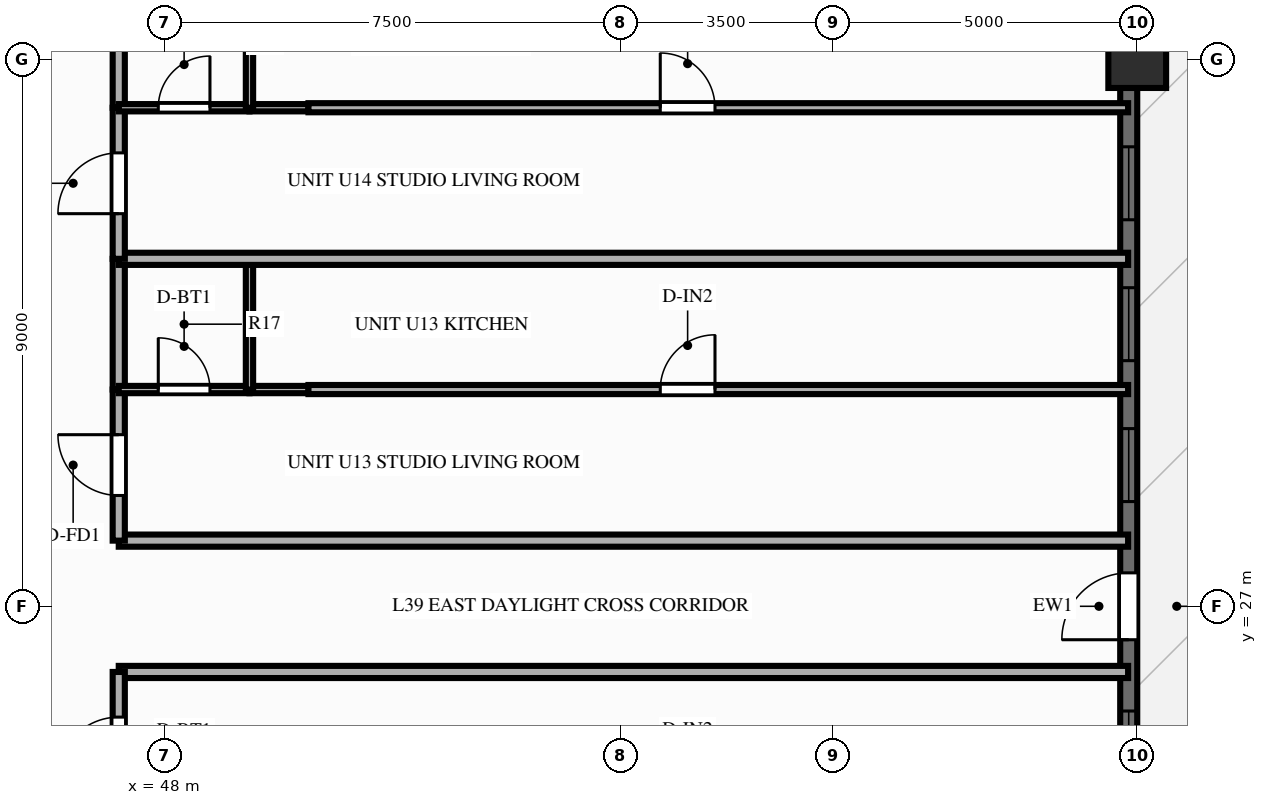
"""IFC4 building model, lengths in metres.
Left out: names, types, materials, properties, quantities, classifications, styles, units other than length and angle.
Written with IfcOpenShell. Run it as: python <this file> out.ifc"""

import sys

from ifc_helpers import new_model, si_unit, direction, frame, frame_2d, origin, origin_2d, place, context, subcontext, project, spatial, rectangle, extrude, source, transform, mapped, element, fill, save


model = new_model("IFC4")
c1 = context("Model", 3, precision=1e-05, world=origin(), true_north=direction((0.0, 1.0)))
c2 = subcontext(c1, "Body", "Model", "MODEL_VIEW")
j1 = project(units=[si_unit("LENGTHUNIT", "METRE"), si_unit("PLANEANGLEUNIT", "RADIAN")], contexts=[c1])
p1 = place(None, origin())
s1 = spatial("IfcSite", under=j1, at=p1, CompositionType="ELEMENT")
p2 = place(p1, origin())
s2 = spatial("IfcBuilding", under=s1, at=p2, CompositionType="ELEMENT")
p3 = place(p2, frame((0.0, 0.0, 122.85)))
s3 = spatial("IfcBuildingStorey", under=s2, at=p3, CompositionType="ELEMENT", Elevation=122.85)
m1 = source(origin(), c2, "Body", "SweptSolid", [
    extrude(rectangle(XDim=0.95, YDim=0.95, at=origin_2d()), origin(), (0.0, 0.0, 1.0), 3.9),
])
p4 = place(p3, frame((64.0, 36.0, 0.0), z_axis=(0.0, 0.0, 1.0), x_axis=(1.0, 0.0, 0.0)))
e1 = element("IfcColumn", 1, at=p4, inside=s3, PredefinedType="COLUMN", context=c2, shape_type="MappedRepresentation", body=[
    mapped(m1, transform((0.0, 0.0, 0.0), scale=1.0)),
])
p5 = place(p3, frame((63.86, 7.2, 0.0), z_axis=(0.0, 0.0, 1.0), x_axis=(0.0, 1.0, 0.0)))
e2 = element("IfcWall", 2, at=p5, inside=s3, PredefinedType="SOLIDWALL", context=c2, shape_type="SweptSolid", body=[
    extrude(rectangle(XDim=39.6, YDim=0.28, at=frame_2d((19.8, 0.0))), origin(), (0.0, 0.0, 1.0), 2.24),
])
p6 = place(p5, frame((0.89, 0.0, 0.25)))
e3 = element("IfcOpeningElement", 3, at=p6, cuts=e2, PredefinedType="OPENING", context=c2, shape_type="SweptSolid", body=[
    extrude(rectangle(XDim=1.2, YDim=1.5, at=frame_2d((0.6, 0.75))), frame((0.0, 0.152, 0.0), z_axis=(0.0, -1.0, 0.0), x_axis=(1.0, 0.0, 0.0)), (0.0, 0.0, 1.0), 0.304),
])
p7 = place(p5, frame((3.14, 0.0, 0.25)))
e4 = element("IfcOpeningElement", 4, at=p7, cuts=e2, PredefinedType="OPENING", context=c2, shape_type="SweptSolid", body=[
    extrude(rectangle(XDim=1.2, YDim=1.5, at=frame_2d((0.6, 0.75))), frame((0.0, 0.152, 0.0), z_axis=(0.0, -1.0, 0.0), x_axis=(1.0, 0.0, 0.0)), (0.0, 0.0, 1.0), 0.304),
])
p8 = place(p5, frame((5.458, 0.0, 0.25)))
e5 = element("IfcOpeningElement", 5, at=p8, cuts=e2, PredefinedType="OPENING", context=c2, shape_type="SweptSolid", body=[
    extrude(rectangle(XDim=1.2, YDim=1.5, at=frame_2d((0.6, 0.75))), frame((0.0, 0.152, 0.0), z_axis=(0.0, -1.0, 0.0), x_axis=(1.0, 0.0, 0.0)), (0.0, 0.0, 1.0), 0.304),
])
p9 = place(p5, frame((7.775, 0.0, 0.25)))
e6 = element("IfcOpeningElement", 6, at=p9, cuts=e2, PredefinedType="OPENING", context=c2, shape_type="SweptSolid", body=[
    extrude(rectangle(XDim=1.2, YDim=1.5, at=frame_2d((0.6, 0.75))), frame((0.0, 0.152, 0.0), z_axis=(0.0, -1.0, 0.0), x_axis=(1.0, 0.0, 0.0)), (0.0, 0.0, 1.0), 0.304),
])
p10 = place(p5, frame((12.242, 0.0, 0.25)))
e7 = element("IfcOpeningElement", 7, at=p10, cuts=e2, PredefinedType="OPENING", context=c2, shape_type="SweptSolid", body=[
    extrude(rectangle(XDim=1.2, YDim=1.5, at=frame_2d((0.6, 0.75))), frame((0.0, 0.152, 0.0), z_axis=(0.0, -1.0, 0.0), x_axis=(1.0, 0.0, 0.0)), (0.0, 0.0, 1.0), 0.304),
])
p11 = place(p5, frame((14.56, 0.0, 0.25)))
e8 = element("IfcOpeningElement", 8, at=p11, cuts=e2, PredefinedType="OPENING", context=c2, shape_type="SweptSolid", body=[
    extrude(rectangle(XDim=1.2, YDim=1.5, at=frame_2d((0.6, 0.75))), frame((0.0, 0.152, 0.0), z_axis=(0.0, -1.0, 0.0), x_axis=(1.0, 0.0, 0.0)), (0.0, 0.0, 1.0), 0.304),
])
p12 = place(p5, frame((16.877, 0.0, 0.25)))
e9 = element("IfcOpeningElement", 9, at=p12, cuts=e2, PredefinedType="OPENING", context=c2, shape_type="SweptSolid", body=[
    extrude(rectangle(XDim=1.2, YDim=1.5, at=frame_2d((0.6, 0.75))), frame((0.0, 0.152, 0.0), z_axis=(0.0, -1.0, 0.0), x_axis=(1.0, 0.0, 0.0)), (0.0, 0.0, 1.0), 0.304),
])
p13 = place(p5, frame((20.35, 0.0, 0.0), z_axis=(0.0, 0.0, 1.0), x_axis=(-1.0, 0.0, 0.0)))
e10 = element("IfcOpeningElement", 10, at=p13, cuts=e2, PredefinedType="OPENING", context=c2, shape_type="SweptSolid", body=[
    extrude(rectangle(XDim=1.1, YDim=2.15, at=frame_2d((0.55, 1.075))), frame((0.0, 0.152, 0.0), z_axis=(0.0, -1.0, 0.0), x_axis=(1.0, 0.0, 0.0)), (0.0, 0.0, 1.0), 0.304),
])
p14 = place(p5, frame((21.522, 0.0, 0.25)))
e11 = element("IfcOpeningElement", 11, at=p14, cuts=e2, PredefinedType="OPENING", context=c2, shape_type="SweptSolid", body=[
    extrude(rectangle(XDim=1.2, YDim=1.5, at=frame_2d((0.6, 0.75))), frame((0.0, 0.152, 0.0), z_axis=(0.0, -1.0, 0.0), x_axis=(1.0, 0.0, 0.0)), (0.0, 0.0, 1.0), 0.304),
])
p15 = place(p5, frame((23.84, 0.0, 0.25)))
e12 = element("IfcOpeningElement", 12, at=p15, cuts=e2, PredefinedType="OPENING", context=c2, shape_type="SweptSolid", body=[
    extrude(rectangle(XDim=1.2, YDim=1.5, at=frame_2d((0.6, 0.75))), frame((0.0, 0.152, 0.0), z_axis=(0.0, -1.0, 0.0), x_axis=(1.0, 0.0, 0.0)), (0.0, 0.0, 1.0), 0.304),
])
p16 = place(p5, frame((26.157, 0.0, 0.25)))
e13 = element("IfcOpeningElement", 13, at=p16, cuts=e2, PredefinedType="OPENING", context=c2, shape_type="SweptSolid", body=[
    extrude(rectangle(XDim=1.2, YDim=1.5, at=frame_2d((0.6, 0.75))), frame((0.0, 0.152, 0.0), z_axis=(0.0, -1.0, 0.0), x_axis=(1.0, 0.0, 0.0)), (0.0, 0.0, 1.0), 0.304),
])
p17 = place(p5, frame((30.625, 0.0, 0.25)))
e14 = element("IfcOpeningElement", 14, at=p17, cuts=e2, PredefinedType="OPENING", context=c2, shape_type="SweptSolid", body=[
    extrude(rectangle(XDim=1.2, YDim=1.5, at=frame_2d((0.6, 0.75))), frame((0.0, 0.152, 0.0), z_axis=(0.0, -1.0, 0.0), x_axis=(1.0, 0.0, 0.0)), (0.0, 0.0, 1.0), 0.304),
])
p18 = place(p5, frame((32.942, 0.0, 0.25)))
e15 = element("IfcOpeningElement", 15, at=p18, cuts=e2, PredefinedType="OPENING", context=c2, shape_type="SweptSolid", body=[
    extrude(rectangle(XDim=1.2, YDim=1.5, at=frame_2d((0.6, 0.75))), frame((0.0, 0.152, 0.0), z_axis=(0.0, -1.0, 0.0), x_axis=(1.0, 0.0, 0.0)), (0.0, 0.0, 1.0), 0.304),
])
p19 = place(p5, frame((35.26, 0.0, 0.25)))
e16 = element("IfcOpeningElement", 16, at=p19, cuts=e2, PredefinedType="OPENING", context=c2, shape_type="SweptSolid", body=[
    extrude(rectangle(XDim=1.2, YDim=1.5, at=frame_2d((0.6, 0.75))), frame((0.0, 0.152, 0.0), z_axis=(0.0, -1.0, 0.0), x_axis=(1.0, 0.0, 0.0)), (0.0, 0.0, 1.0), 0.304),
])
p20 = place(p5, frame((37.51, 0.0, 0.25)))
e17 = element("IfcOpeningElement", 17, at=p20, cuts=e2, PredefinedType="OPENING", context=c2, shape_type="SweptSolid", body=[
    extrude(rectangle(XDim=1.2, YDim=1.5, at=frame_2d((0.6, 0.75))), frame((0.0, 0.152, 0.0), z_axis=(0.0, -1.0, 0.0), x_axis=(1.0, 0.0, 0.0)), (0.0, 0.0, 1.0), 0.304),
])
p21 = place(p3, frame((47.25, 25.92, 0.0), z_axis=(0.0, 0.0, 1.0), x_axis=(1.0, 0.0, 0.0)))
e18 = element("IfcWall", 18, at=p21, inside=s3, PredefinedType="PARTITIONING", context=c2, shape_type="SweptSolid", body=[
    extrude(rectangle(XDim=16.6, YDim=0.2, at=frame_2d((8.3, 0.0))), origin(), (0.0, 0.0, 1.0), 3.56),
])
p22 = place(p3, frame((47.25, 23.435, 0.0), z_axis=(0.0, 0.0, 1.0), x_axis=(0.0, 1.0, 0.0)))
e19 = element("IfcWall", 19, at=p22, inside=s3, PredefinedType="PARTITIONING", context=c2, shape_type="SweptSolid", body=[
    extrude(rectangle(XDim=2.485, YDim=0.2, at=frame_2d((1.242, 0.0))), origin(), (0.0, 0.0, 1.0), 3.56),
])
p23 = place(p22, frame((0.742, 0.0, 0.0)))
e20 = element("IfcOpeningElement", 20, at=p23, cuts=e19, PredefinedType="OPENING", context=c2, shape_type="SweptSolid", body=[
    extrude(rectangle(XDim=1.0, YDim=2.15, at=frame_2d((0.5, 1.075))), frame((0.0, 0.112, 0.0), z_axis=(0.0, -1.0, 0.0), x_axis=(1.0, 0.0, 0.0)), (0.0, 0.0, 1.0), 0.224),
])
p24 = place(p3, frame((47.25, 28.08, 0.0), z_axis=(0.0, 0.0, 1.0), x_axis=(1.0, 0.0, 0.0)))
e21 = element("IfcWall", 21, at=p24, inside=s3, PredefinedType="PARTITIONING", context=c2, shape_type="SweptSolid", body=[
    extrude(rectangle(XDim=16.6, YDim=0.2, at=frame_2d((8.3, 0.0))), origin(), (0.0, 0.0, 1.0), 3.56),
])
p25 = place(p3, frame((47.25, 28.08, 0.0), z_axis=(0.0, 0.0, 1.0), x_axis=(0.0, 1.0, 0.0)))
e22 = element("IfcWall", 22, at=p25, inside=s3, PredefinedType="PARTITIONING", context=c2, shape_type="SweptSolid", body=[
    extrude(rectangle(XDim=2.485, YDim=0.2, at=frame_2d((1.242, 0.0))), origin(), (0.0, 0.0, 1.0), 3.56),
])
p26 = place(p25, frame((0.742, 0.0, 0.0)))
e23 = element("IfcOpeningElement", 23, at=p26, cuts=e22, PredefinedType="OPENING", context=c2, shape_type="SweptSolid", body=[
    extrude(rectangle(XDim=1.0, YDim=2.15, at=frame_2d((0.5, 1.075))), frame((0.0, 0.112, 0.0), z_axis=(0.0, -1.0, 0.0), x_axis=(1.0, 0.0, 0.0)), (0.0, 0.0, 1.0), 0.224),
])
p27 = place(p3, frame((47.25, 30.565, 0.0), z_axis=(0.0, 0.0, 1.0), x_axis=(0.0, 1.0, 0.0)))
e24 = element("IfcWall", 24, at=p27, inside=s3, PredefinedType="PARTITIONING", context=c2, shape_type="SweptSolid", body=[
    extrude(rectangle(XDim=2.15, YDim=0.2, at=frame_2d((1.075, 0.0))), origin(), (0.0, 0.0, 1.0), 3.56),
])
p28 = place(p3, frame((47.25, 30.565, 0.0), z_axis=(0.0, 0.0, 1.0), x_axis=(1.0, 0.0, 0.0)))
e25 = element("IfcWall", 25, at=p28, inside=s3, PredefinedType="PARTITIONING", context=c2, shape_type="SweptSolid", body=[
    extrude(rectangle(XDim=2.15, YDim=0.12, at=frame_2d((1.075, 0.0))), origin(), (0.0, 0.0, 1.0), 3.56),
])
p29 = place(p28, frame((0.65, 0.0, 0.0)))
e26 = element("IfcOpeningElement", 26, at=p29, cuts=e25, PredefinedType="OPENING", context=c2, shape_type="SweptSolid", body=[
    extrude(rectangle(XDim=0.85, YDim=2.05, at=frame_2d((0.425, 1.025))), frame((0.0, 0.072, 0.0), z_axis=(0.0, -1.0, 0.0), x_axis=(1.0, 0.0, 0.0)), (0.0, 0.0, 1.0), 0.144),
])
p30 = place(p3, frame((49.4, 30.565, 0.0), z_axis=(0.0, 0.0, 1.0), x_axis=(1.0, 0.0, 0.0)))
e27 = element("IfcWall", 27, at=p30, inside=s3, PredefinedType="PARTITIONING", context=c2, shape_type="SweptSolid", body=[
    extrude(rectangle(XDim=0.97, YDim=0.12, at=frame_2d((0.485, 0.0))), origin(), (0.0, 0.0, 1.0), 3.56),
])
p31 = place(p3, frame((49.4, 30.565, 0.0), z_axis=(0.0, 0.0, 1.0), x_axis=(0.0, 1.0, 0.0)))
e28 = element("IfcWall", 28, at=p31, inside=s3, PredefinedType="PARTITIONING", context=c2, shape_type="SweptSolid", body=[
    extrude(rectangle(XDim=2.15, YDim=0.12, at=frame_2d((1.075, 0.0))), origin(), (0.0, 0.0, 1.0), 3.56),
])
p32 = place(p3, frame((50.37, 30.565, 0.0), z_axis=(0.0, 0.0, 1.0), x_axis=(1.0, 0.0, 0.0)))
e29 = element("IfcWall", 29, at=p32, inside=s3, PredefinedType="PARTITIONING", context=c2, shape_type="SweptSolid", body=[
    extrude(rectangle(XDim=13.48, YDim=0.15, at=frame_2d((6.74, 0.0))), origin(), (0.0, 0.0, 1.0), 3.56),
])
p33 = place(p32, frame((5.786, 0.0, 0.0)))
e30 = element("IfcOpeningElement", 30, at=p33, cuts=e29, PredefinedType="OPENING", context=c2, shape_type="SweptSolid", body=[
    extrude(rectangle(XDim=0.9, YDim=2.1, at=frame_2d((0.45, 1.05))), frame((0.0, 0.087, 0.0), z_axis=(0.0, -1.0, 0.0), x_axis=(1.0, 0.0, 0.0)), (0.0, 0.0, 1.0), 0.174),
])
p34 = place(p3, frame((47.25, 32.715, 0.0), z_axis=(0.0, 0.0, 1.0), x_axis=(1.0, 0.0, 0.0)))
e31 = element("IfcWall", 31, at=p34, inside=s3, PredefinedType="PARTITIONING", context=c2, shape_type="SweptSolid", body=[
    extrude(rectangle(XDim=16.6, YDim=0.2, at=frame_2d((8.3, 0.0))), origin(), (0.0, 0.0, 1.0), 3.56),
])
p35 = place(p3, frame((47.25, 32.715, 0.0), z_axis=(0.0, 0.0, 1.0), x_axis=(0.0, 1.0, 0.0)))
e32 = element("IfcWall", 32, at=p35, inside=s3, PredefinedType="PARTITIONING", context=c2, shape_type="SweptSolid", body=[
    extrude(rectangle(XDim=2.485, YDim=0.2, at=frame_2d((1.242, 0.0))), origin(), (0.0, 0.0, 1.0), 3.56),
])
p36 = place(p35, frame((0.742, 0.0, 0.0)))
e33 = element("IfcOpeningElement", 33, at=p36, cuts=e32, PredefinedType="OPENING", context=c2, shape_type="SweptSolid", body=[
    extrude(rectangle(XDim=1.0, YDim=2.15, at=frame_2d((0.5, 1.075))), frame((0.0, 0.112, 0.0), z_axis=(0.0, -1.0, 0.0), x_axis=(1.0, 0.0, 0.0)), (0.0, 0.0, 1.0), 0.224),
])
p37 = place(p3, frame((47.25, 35.2, 0.0), z_axis=(0.0, 0.0, 1.0), x_axis=(0.0, 1.0, 0.0)))
e34 = element("IfcWall", 34, at=p37, inside=s3, PredefinedType="PARTITIONING", context=c2, shape_type="SweptSolid", body=[
    extrude(rectangle(XDim=2.15, YDim=0.2, at=frame_2d((1.075, 0.0))), origin(), (0.0, 0.0, 1.0), 3.56),
])
p38 = place(p3, frame((47.25, 35.2, 0.0), z_axis=(0.0, 0.0, 1.0), x_axis=(1.0, 0.0, 0.0)))
e35 = element("IfcWall", 35, at=p38, inside=s3, PredefinedType="PARTITIONING", context=c2, shape_type="SweptSolid", body=[
    extrude(rectangle(XDim=2.15, YDim=0.12, at=frame_2d((1.075, 0.0))), origin(), (0.0, 0.0, 1.0), 3.56),
])
p39 = place(p38, frame((0.65, 0.0, 0.0)))
e36 = element("IfcOpeningElement", 36, at=p39, cuts=e35, PredefinedType="OPENING", context=c2, shape_type="SweptSolid", body=[
    extrude(rectangle(XDim=0.85, YDim=2.05, at=frame_2d((0.425, 1.025))), frame((0.0, 0.072, 0.0), z_axis=(0.0, -1.0, 0.0), x_axis=(1.0, 0.0, 0.0)), (0.0, 0.0, 1.0), 0.144),
])
p40 = place(p3, frame((49.4, 35.2, 0.0), z_axis=(0.0, 0.0, 1.0), x_axis=(1.0, 0.0, 0.0)))
e37 = element("IfcWall", 37, at=p40, inside=s3, PredefinedType="PARTITIONING", context=c2, shape_type="SweptSolid", body=[
    extrude(rectangle(XDim=0.97, YDim=0.12, at=frame_2d((0.485, 0.0))), origin(), (0.0, 0.0, 1.0), 3.56),
])
p41 = place(p3, frame((49.4, 35.2, 0.0), z_axis=(0.0, 0.0, 1.0), x_axis=(0.0, 1.0, 0.0)))
e38 = element("IfcWall", 38, at=p41, inside=s3, PredefinedType="PARTITIONING", context=c2, shape_type="SweptSolid", body=[
    extrude(rectangle(XDim=2.15, YDim=0.12, at=frame_2d((1.075, 0.0))), origin(), (0.0, 0.0, 1.0), 3.56),
])
p42 = place(p3, frame((50.37, 35.2, 0.0), z_axis=(0.0, 0.0, 1.0), x_axis=(1.0, 0.0, 0.0)))
e39 = element("IfcWall", 39, at=p42, inside=s3, PredefinedType="PARTITIONING", context=c2, shape_type="SweptSolid", body=[
    extrude(rectangle(XDim=13.48, YDim=0.15, at=frame_2d((6.74, 0.0))), origin(), (0.0, 0.0, 1.0), 3.56),
])
p43 = place(p42, frame((5.786, 0.0, 0.0)))
e40 = element("IfcOpeningElement", 40, at=p43, cuts=e39, PredefinedType="OPENING", context=c2, shape_type="SweptSolid", body=[
    extrude(rectangle(XDim=0.9, YDim=2.1, at=frame_2d((0.45, 1.05))), frame((0.0, 0.087, 0.0), z_axis=(0.0, -1.0, 0.0), x_axis=(1.0, 0.0, 0.0)), (0.0, 0.0, 1.0), 0.174),
])
m2 = source(origin(), c2, "Body", "SweptSolid", [
    extrude(rectangle(XDim=1.2, YDim=1.5, at=frame_2d((0.6, 0.75))), frame((0.0, 0.03, 0.0), z_axis=(0.0, -1.0, 0.0), x_axis=(1.0, 0.0, 0.0)), (0.0, 0.0, 1.0), 0.06),
])
p44 = place(p12, origin())
e41 = element("IfcWindow", 41, at=p44, inside=s3, PartitioningType="SINGLE_PANEL", PredefinedType="WINDOW", context=c2, shape_type="MappedRepresentation", body=[
    mapped(m2, transform((0.0, 0.0, 0.0), scale=1.0)),
])
fill(e9, e41)
m3 = source(origin(), c2, "Body", "SweptSolid", [
    extrude(rectangle(XDim=1.1, YDim=2.15, at=frame_2d((0.55, 1.075))), frame((0.0, 0.025, 0.0), z_axis=(0.0, -1.0, 0.0), x_axis=(1.0, 0.0, 0.0)), (0.0, 0.0, 1.0), 0.05),
])
p45 = place(p13, origin())
e42 = element("IfcDoor", 42, at=p45, inside=s3, OperationType="SINGLE_SWING_RIGHT", PredefinedType="DOOR", context=c2, shape_type="MappedRepresentation", body=[
    mapped(m3, transform((0.0, 0.0, 0.0), scale=1.0)),
])
fill(e10, e42)
p46 = place(p14, origin())
e43 = element("IfcWindow", 43, at=p46, inside=s3, PartitioningType="SINGLE_PANEL", PredefinedType="WINDOW", context=c2, shape_type="MappedRepresentation", body=[
    mapped(m2, transform((0.0, 0.0, 0.0), scale=1.0)),
])
fill(e11, e43)
p47 = place(p15, origin())
e44 = element("IfcWindow", 44, at=p47, inside=s3, PartitioningType="SINGLE_PANEL", PredefinedType="WINDOW", context=c2, shape_type="MappedRepresentation", body=[
    mapped(m2, transform((0.0, 0.0, 0.0), scale=1.0)),
])
fill(e12, e44)
p48 = place(p16, origin())
e45 = element("IfcWindow", 45, at=p48, inside=s3, PartitioningType="SINGLE_PANEL", PredefinedType="WINDOW", context=c2, shape_type="MappedRepresentation", body=[
    mapped(m2, transform((0.0, 0.0, 0.0), scale=1.0)),
])
fill(e13, e45)
m4 = source(origin(), c2, "Body", "SweptSolid", [
    extrude(rectangle(XDim=1.0, YDim=2.15, at=frame_2d((0.5, 1.075))), frame((0.0, 0.025, 0.0), z_axis=(0.0, -1.0, 0.0), x_axis=(1.0, 0.0, 0.0)), (0.0, 0.0, 1.0), 0.05),
])
p49 = place(p23, origin())
e46 = element("IfcDoor", 46, at=p49, inside=s3, OperationType="SINGLE_SWING_LEFT", PredefinedType="DOOR", context=c2, shape_type="MappedRepresentation", body=[
    mapped(m4, transform((0.0, 0.0, 0.0), scale=1.0)),
])
fill(e20, e46)
p50 = place(p26, origin())
e47 = element("IfcDoor", 47, at=p50, inside=s3, OperationType="SINGLE_SWING_RIGHT", PredefinedType="DOOR", context=c2, shape_type="MappedRepresentation", body=[
    mapped(m4, transform((0.0, 0.0, 0.0), scale=1.0)),
])
fill(e23, e47)
m5 = source(origin(), c2, "Body", "SweptSolid", [
    extrude(rectangle(XDim=0.85, YDim=2.05, at=frame_2d((0.425, 1.025))), frame((0.0, 0.025, 0.0), z_axis=(0.0, -1.0, 0.0), x_axis=(1.0, 0.0, 0.0)), (0.0, 0.0, 1.0), 0.05),
])
p51 = place(p29, origin())
e48 = element("IfcDoor", 48, at=p51, inside=s3, OperationType="SINGLE_SWING_LEFT", PredefinedType="DOOR", context=c2, shape_type="MappedRepresentation", body=[
    mapped(m5, transform((0.0, 0.0, 0.0), scale=1.0)),
])
fill(e26, e48)
m6 = source(origin(), c2, "Body", "SweptSolid", [
    extrude(rectangle(XDim=0.9, YDim=2.1, at=frame_2d((0.45, 1.05))), frame((0.0, 0.025, 0.0), z_axis=(0.0, -1.0, 0.0), x_axis=(1.0, 0.0, 0.0)), (0.0, 0.0, 1.0), 0.05),
])
p52 = place(p33, origin())
e49 = element("IfcDoor", 49, at=p52, inside=s3, OperationType="SINGLE_SWING_RIGHT", PredefinedType="DOOR", context=c2, shape_type="MappedRepresentation", body=[
    mapped(m6, transform((0.0, 0.0, 0.0), scale=1.0)),
])
fill(e30, e49)
p53 = place(p36, origin())
e50 = element("IfcDoor", 50, at=p53, inside=s3, OperationType="SINGLE_SWING_LEFT", PredefinedType="DOOR", context=c2, shape_type="MappedRepresentation", body=[
    mapped(m4, transform((0.0, 0.0, 0.0), scale=1.0)),
])
fill(e33, e50)
p54 = place(p39, origin())
e51 = element("IfcDoor", 51, at=p54, inside=s3, OperationType="SINGLE_SWING_RIGHT", PredefinedType="DOOR", context=c2, shape_type="MappedRepresentation", body=[
    mapped(m5, transform((0.0, 0.0, 0.0), scale=1.0)),
])
fill(e36, e51)
p55 = place(p43, origin())
e52 = element("IfcDoor", 52, at=p55, inside=s3, OperationType="SINGLE_SWING_LEFT", PredefinedType="DOOR", context=c2, shape_type="MappedRepresentation", body=[
    mapped(m6, transform((0.0, 0.0, 0.0), scale=1.0)),
])
fill(e40, e52)
save(model, sys.argv[1])
